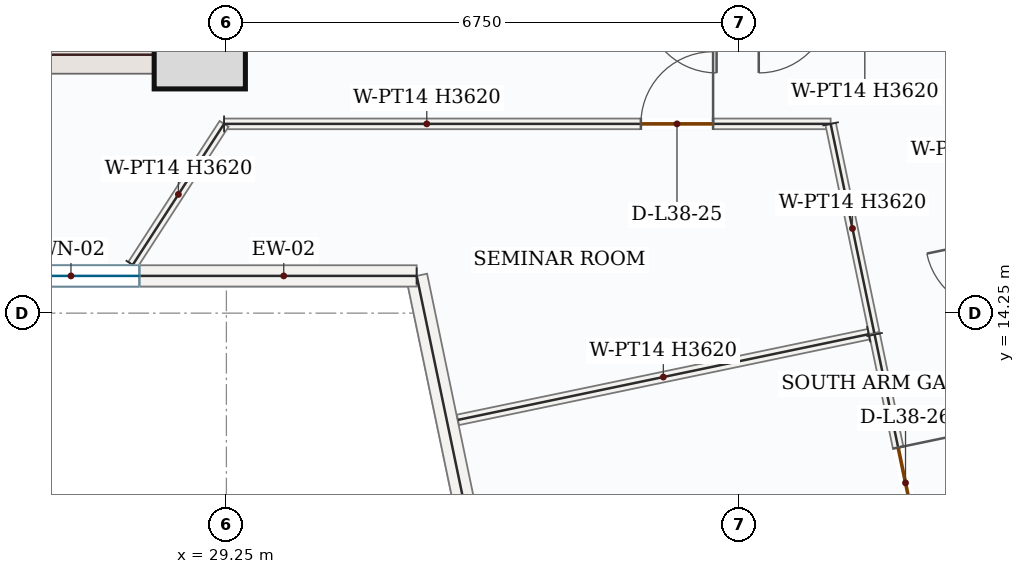
"""IFC4 building model, lengths in metres.
Left out: names, types, materials, properties, quantities, classifications, styles, units other than length and angle.
Written with IfcOpenShell. Run it as: python <this file> out.ifc"""

import sys

from ifc_helpers import new_model, si_unit, direction, frame, frame_2d, origin, origin_2d, place, context, subcontext, project, spatial, rectangle, extrude, source, transform, mapped, element, fill, save


model = new_model("IFC4")
c1 = context("Model", 3, precision=1e-05, world=origin(), true_north=direction((0.0, 1.0)))
c2 = subcontext(c1, "Body", "Model", "MODEL_VIEW")
j1 = project(units=[si_unit("LENGTHUNIT", "METRE"), si_unit("PLANEANGLEUNIT", "RADIAN")], contexts=[c1])
p1 = place(None, origin())
s1 = spatial("IfcSite", under=j1, at=p1, CompositionType="ELEMENT")
p2 = place(p1, origin())
s2 = spatial("IfcBuilding", under=s1, at=p2, CompositionType="ELEMENT")
p3 = place(p2, frame((0.0, 0.0, 166.8)))
s3 = spatial("IfcBuildingStorey", under=s2, at=p3, CompositionType="ELEMENT", Elevation=166.8)
p4 = place(p3, frame((29.0, 17.4, 0.0), z_axis=(0.0, 0.0, 1.0), x_axis=(0.0, 1.0, 0.0)))
e1 = element("IfcWall", 1, at=p4, inside=s3, PredefinedType="SHEAR", context=c2, shape_type="SweptSolid", body=[
    extrude(rectangle(XDim=8.55, YDim=0.5, at=frame_2d((4.275, 0.0))), origin(), (0.0, 0.0, 1.0), 3.62),
])
p5 = place(p4, frame((6.65, 0.0, 0.0)))
e2 = element("IfcOpeningElement", 2, at=p5, cuts=e1, PredefinedType="OPENING", context=c2, shape_type="SweptSolid", body=[
    extrude(rectangle(XDim=1.1, YDim=2.2, at=frame_2d((0.55, 1.1))), frame((0.0, 0.26, 0.0), z_axis=(0.0, -1.0, 0.0), x_axis=(1.0, 0.0, 0.0)), (0.0, 0.0, 1.0), 0.52),
])
p6 = place(p4, frame((2.15, 0.0, 0.0)))
e3 = element("IfcOpeningElement", 3, at=p6, cuts=e1, PredefinedType="OPENING", context=c2, shape_type="SweptSolid", body=[
    extrude(rectangle(XDim=0.88, YDim=2.1, at=frame_2d((0.44, 1.05))), frame((0.0, 0.26, 0.0), z_axis=(0.0, -1.0, 0.0), x_axis=(1.0, 0.0, 0.0)), (0.0, 0.0, 1.0), 0.52),
])
p7 = place(p4, frame((4.25, 0.0, 0.0)))
e4 = element("IfcOpeningElement", 4, at=p7, cuts=e1, PredefinedType="OPENING", context=c2, shape_type="SweptSolid", body=[
    extrude(rectangle(XDim=0.88, YDim=2.1, at=frame_2d((0.44, 1.05))), frame((0.0, 0.26, 0.0), z_axis=(0.0, -1.0, 0.0), x_axis=(1.0, 0.0, 0.0)), (0.0, 0.0, 1.0), 0.52),
])
m1 = source(origin(), c2, "Body", "SweptSolid", [
    extrude(rectangle(XDim=7.0, YDim=0.5, at=frame_2d((3.5, 0.0))), origin(), (0.0, 0.0, 1.0), 3.62),
])
p8 = place(p3, frame((21.75, 17.65, 0.0), z_axis=(0.0, 0.0, 1.0), x_axis=(1.0, 0.0, 0.0)))
e5 = element("IfcWall", 5, at=p8, inside=s3, PredefinedType="SHEAR", context=c2, shape_type="MappedRepresentation", body=[
    mapped(m1, transform((0.0, 0.0, 0.0), x_axis=(1.0, 0.0, 0.0), y_axis=(0.0, 1.0, 0.0), z_axis=(0.0, 0.0, 1.0), scale=1.0)),
])
m2 = source(origin(), c2, "Body", "SweptSolid", [
    extrude(rectangle(XDim=1.2, YDim=1.2, at=origin_2d()), origin(), (0.0, 0.0, 1.0), 3.9),
])
p9 = place(p3, frame((28.9, 17.8, 0.0), z_axis=(0.0, 0.0, 1.0), x_axis=(1.0, 0.0, 0.0)))
e6 = element("IfcColumn", 6, at=p9, inside=s3, PredefinedType="COLUMN", context=c2, shape_type="MappedRepresentation", body=[
    mapped(m2, transform((0.0, 0.0, 0.0), x_axis=(1.0, 0.0, 0.0), y_axis=(0.0, 1.0, 0.0), z_axis=(0.0, 0.0, 1.0), scale=1.0)),
])
p10 = place(p3, frame((33.433, 6.688, 0.0), z_axis=(0.0, 0.0, 1.0), x_axis=(-0.204152195211, 0.978939161128, 0.0)))
e7 = element("IfcWall", 7, at=p10, inside=s3, PredefinedType="SOLIDWALL", context=c2, shape_type="SweptSolid", body=[
    extrude(rectangle(XDim=8.225, YDim=0.28, at=frame_2d((4.113, 0.0))), origin(), (0.0, 0.0, 1.0), 3.62),
])
p11 = place(p10, frame((3.213, 0.0, 0.85)))
e8 = element("IfcOpeningElement", 8, at=p11, cuts=e7, PredefinedType="OPENING", context=c2, shape_type="SweptSolid", body=[
    extrude(rectangle(XDim=1.8, YDim=1.75, at=frame_2d((0.9, 0.875))), frame((0.0, 0.15, 0.0), z_axis=(0.0, -1.0, 0.0), x_axis=(1.0, 0.0, 0.0)), (0.0, 0.0, 1.0), 0.3),
])
p12 = place(p3, frame((31.753, 14.74, 0.0), z_axis=(0.0, 0.0, 1.0), x_axis=(-1.0, 0.0, 0.0)))
e9 = element("IfcWall", 9, at=p12, inside=s3, PredefinedType="SOLIDWALL", context=c2, shape_type="SweptSolid", body=[
    extrude(rectangle(XDim=9.095, YDim=0.28, at=frame_2d((4.548, 0.0))), origin(), (0.0, 0.0, 1.0), 3.62),
])
p13 = place(p12, frame((3.648, 0.0, 0.85)))
e10 = element("IfcOpeningElement", 10, at=p13, cuts=e9, PredefinedType="OPENING", context=c2, shape_type="SweptSolid", body=[
    extrude(rectangle(XDim=1.8, YDim=1.75, at=frame_2d((0.9, 0.875))), frame((0.0, 0.15, 0.0), z_axis=(0.0, -1.0, 0.0), x_axis=(1.0, 0.0, 0.0)), (0.0, 0.0, 1.0), 0.3),
])
p14 = place(p3, frame((29.219, 16.74, 0.0), z_axis=(0.0, 0.0, 1.0), x_axis=(1.0, 0.0, 0.0)))
e11 = element("IfcWall", 11, at=p14, inside=s3, PredefinedType="PARTITIONING", context=c2, shape_type="SweptSolid", body=[
    extrude(rectangle(XDim=7.98, YDim=0.14, at=frame_2d((3.99, 0.0))), origin(), (0.0, 0.0, 1.0), 3.62),
])
p15 = place(p14, frame((5.484, 0.0, 0.0)))
e12 = element("IfcOpeningElement", 12, at=p15, cuts=e11, PredefinedType="OPENING", context=c2, shape_type="SweptSolid", body=[
    extrude(rectangle(XDim=0.95, YDim=2.15, at=frame_2d((0.475, 1.075))), frame((0.0, 0.08, 0.0), z_axis=(0.0, -1.0, 0.0), x_axis=(1.0, 0.0, 0.0)), (0.0, 0.0, 1.0), 0.16),
])
m3 = source(origin(), c2, "Body", "SweptSolid", [
    extrude(rectangle(XDim=2.811, YDim=0.14, at=frame_2d((1.406, 0.0))), origin(), (0.0, 0.0, 1.0), 3.62),
])
p16 = place(p3, frame((37.2, 16.74, 0.0), z_axis=(0.0, 0.0, 1.0), x_axis=(0.204092977776, -0.978951508719, 0.0)))
e13 = element("IfcWall", 13, at=p16, inside=s3, PredefinedType="PARTITIONING", context=c2, shape_type="MappedRepresentation", body=[
    mapped(m3, transform((0.0, 0.0, 0.0), x_axis=(1.0, 0.0, 0.0), y_axis=(0.0, 1.0, 0.0), z_axis=(0.0, 0.0, 1.0), scale=1.0)),
])
m4 = source(origin(), c2, "Body", "SweptSolid", [
    extrude(rectangle(XDim=5.52, YDim=0.14, at=frame_2d((2.76, 0.0))), origin(), (0.0, 0.0, 1.0), 3.62),
])
p17 = place(p3, frame((37.7, 13.973, 0.0), z_axis=(0.0, 0.0, 1.0), x_axis=(-0.978929612498, -0.204197976909, 0.0)))
e14 = element("IfcWall", 14, at=p17, inside=s3, PredefinedType="PARTITIONING", context=c2, shape_type="MappedRepresentation", body=[
    mapped(m4, transform((0.0, 0.0, 0.0), x_axis=(1.0, 0.0, 0.0), y_axis=(0.0, 1.0, 0.0), z_axis=(0.0, 0.0, 1.0), scale=1.0)),
])
m5 = source(origin(), c2, "Body", "SweptSolid", [
    extrude(rectangle(XDim=2.21, YDim=0.14, at=frame_2d((1.105, 0.0))), origin(), (0.0, 0.0, 1.0), 3.62),
])
p18 = place(p3, frame((28.018, 14.885, 0.0), z_axis=(0.0, 0.0, 1.0), x_axis=(0.543613077793, 0.83933594088, 0.0)))
e15 = element("IfcWall", 15, at=p18, inside=s3, PredefinedType="PARTITIONING", context=c2, shape_type="MappedRepresentation", body=[
    mapped(m5, transform((0.0, 0.0, 0.0), x_axis=(1.0, 0.0, 0.0), y_axis=(0.0, 1.0, 0.0), z_axis=(0.0, 0.0, 1.0), scale=1.0)),
])
p19 = place(p3, frame((37.778, 13.969, 0.0), z_axis=(0.0, 0.0, 1.0), x_axis=(0.204175249208, -0.978934353065, 0.0)))
e16 = element("IfcWall", 16, at=p19, inside=s3, PredefinedType="PARTITIONING", context=c2, shape_type="SweptSolid", body=[
    extrude(rectangle(XDim=7.853, YDim=0.14, at=frame_2d((3.926, 0.0))), origin(), (0.0, 0.0, 1.0), 3.62),
])
p20 = place(p19, frame((1.519, 0.0, 0.0)))
e17 = element("IfcOpeningElement", 17, at=p20, cuts=e16, PredefinedType="OPENING", context=c2, shape_type="SweptSolid", body=[
    extrude(rectangle(XDim=0.95, YDim=2.15, at=frame_2d((0.475, 1.075))), frame((0.0, 0.08, 0.0), z_axis=(0.0, -1.0, 0.0), x_axis=(1.0, 0.0, 0.0)), (0.0, 0.0, 1.0), 0.16),
])
m6 = source(origin(), c2, "Body", "SweptSolid", [
    extrude(rectangle(XDim=1.8, YDim=1.75, at=frame_2d((0.9, 0.875))), frame((0.0, 0.03, 0.0), z_axis=(0.0, -1.0, 0.0), x_axis=(1.0, 0.0, 0.0)), (0.0, 0.0, 1.0), 0.06),
])
p21 = place(p13, origin())
e18 = element("IfcWindow", 18, at=p21, inside=s3, PartitioningType="DOUBLE_PANEL_VERTICAL", PredefinedType="WINDOW", context=c2, shape_type="MappedRepresentation", body=[
    mapped(m6, transform((0.0, 0.0, 0.0), x_axis=(1.0, 0.0, 0.0), y_axis=(0.0, 1.0, 0.0), z_axis=(0.0, 0.0, 1.0), scale=1.0)),
])
fill(e10, e18)
m7 = source(origin(), c2, "Body", "SweptSolid", [
    extrude(rectangle(XDim=0.95, YDim=2.15, at=frame_2d((0.475, 1.075))), frame((0.0, 0.025, 0.0), z_axis=(0.0, -1.0, 0.0), x_axis=(1.0, 0.0, 0.0)), (0.0, 0.0, 1.0), 0.05),
])
p22 = place(p15, origin())
e19 = element("IfcDoor", 19, at=p22, inside=s3, OperationType="SINGLE_SWING_RIGHT", PredefinedType="DOOR", context=c2, shape_type="MappedRepresentation", body=[
    mapped(m7, transform((0.0, 0.0, 0.0), x_axis=(1.0, 0.0, 0.0), y_axis=(0.0, 1.0, 0.0), z_axis=(0.0, 0.0, 1.0), scale=1.0)),
])
fill(e12, e19)
p23 = place(p20, origin())
e20 = element("IfcDoor", 20, at=p23, inside=s3, OperationType="SINGLE_SWING_LEFT", PredefinedType="DOOR", context=c2, shape_type="MappedRepresentation", body=[
    mapped(m7, transform((0.0, 0.0, 0.0), x_axis=(1.0, 0.0, 0.0), y_axis=(0.0, 1.0, 0.0), z_axis=(0.0, 0.0, 1.0), scale=1.0)),
])
fill(e17, e20)
save(model, sys.argv[1])
